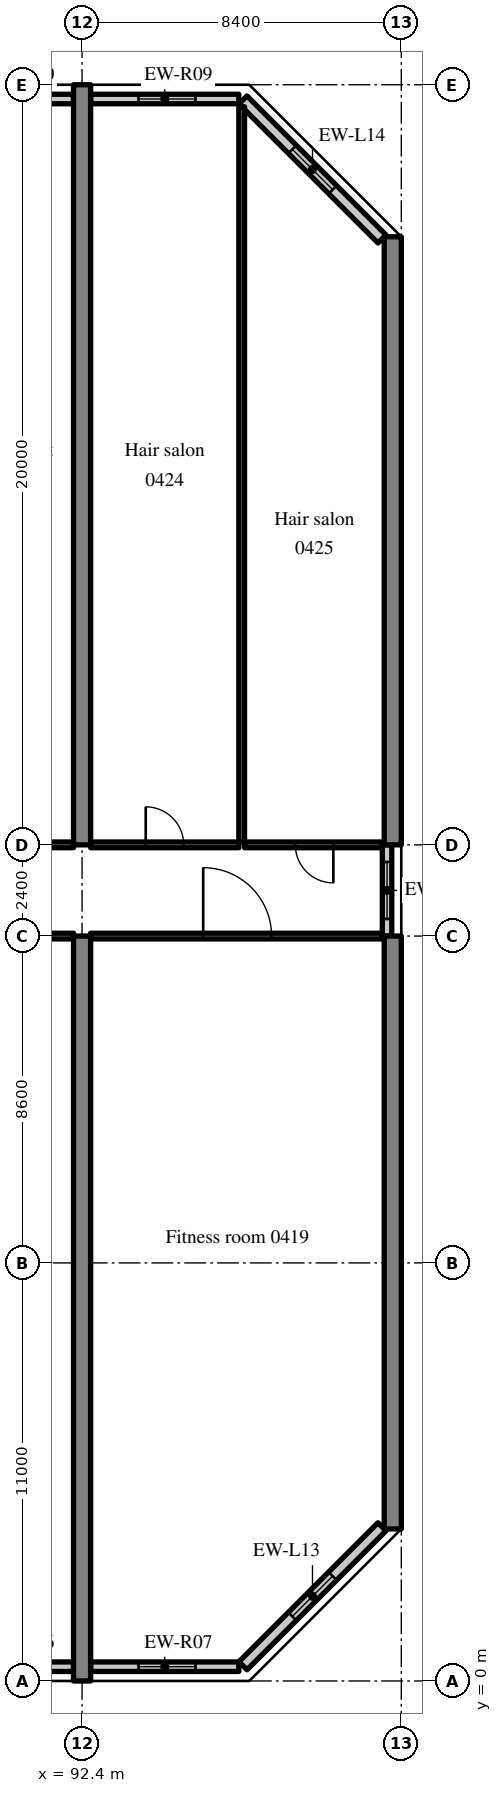
"""IFC4 building model, lengths in metres.
Left out: names, types, materials, properties, quantities, classifications, styles, units other than length and angle.
Written with IfcOpenShell. Run it as: python <this file> out.ifc"""

import sys

from ifc_helpers import new_model, si_unit, direction, frame, frame_2d, origin, place, context, subcontext, project, spatial, rectangle, extrude, source, transform, mapped, element, fill, save


model = new_model("IFC4")
c1 = context("Model", 3, precision=1e-05, world=origin(), true_north=direction((0.0, 1.0)))
c2 = subcontext(c1, "Body", "Model", "MODEL_VIEW")
j1 = project(units=[si_unit("LENGTHUNIT", "METRE"), si_unit("PLANEANGLEUNIT", "RADIAN")], contexts=[c1])
p1 = place(None, origin())
s1 = spatial("IfcSite", under=j1, at=p1, CompositionType="ELEMENT")
p2 = place(p1, origin())
s2 = spatial("IfcBuilding", under=s1, at=p2, CompositionType="ELEMENT")
p3 = place(p2, frame((0.0, 0.0, 23.0)))
s3 = spatial("IfcBuildingStorey", under=s2, at=p3, CompositionType="ELEMENT", Elevation=23.0)
m1 = source(origin(), c2, "Body", "SweptSolid", [
    extrude(rectangle(XDim=19.6, YDim=0.45, at=frame_2d((9.8, 0.0))), origin(), (0.0, 0.0, 1.0), 4.52),
])
p4 = place(p3, frame((92.4, 0.0, 0.0), z_axis=(0.0, 0.0, 1.0), x_axis=(0.0, 1.0, 0.0)))
e1 = element("IfcWall", 1, at=p4, inside=s3, PredefinedType="SHEAR", context=c2, shape_type="MappedRepresentation", body=[
    mapped(m1, transform((0.0, 0.0, 0.0), scale=1.0)),
])
m2 = source(origin(), c2, "Body", "SweptSolid", [
    extrude(rectangle(XDim=20.0, YDim=0.45, at=frame_2d((10.0, 0.0))), origin(), (0.0, 0.0, 1.0), 4.52),
])
p5 = place(p3, frame((92.4, 22.0, 0.0), z_axis=(0.0, 0.0, 1.0), x_axis=(0.0, 1.0, 0.0)))
e2 = element("IfcWall", 2, at=p5, inside=s3, PredefinedType="SHEAR", context=c2, shape_type="MappedRepresentation", body=[
    mapped(m2, transform((0.0, 0.0, 0.0), scale=1.0)),
])
m3 = source(origin(), c2, "Body", "SweptSolid", [
    extrude(rectangle(XDim=15.6, YDim=0.45, at=frame_2d((7.8, 0.0))), origin(), (0.0, 0.0, 1.0), 4.52),
])
p6 = place(p3, frame((100.575, 4.0, 0.0), z_axis=(0.0, 0.0, 1.0), x_axis=(0.0, 1.0, 0.0)))
e3 = element("IfcWall", 3, at=p6, inside=s3, PredefinedType="SHEAR", context=c2, shape_type="MappedRepresentation", body=[
    mapped(m3, transform((0.0, 0.0, 0.0), scale=1.0)),
])
m4 = source(origin(), c2, "Body", "SweptSolid", [
    extrude(rectangle(XDim=16.0, YDim=0.45, at=frame_2d((8.0, 0.0))), origin(), (0.0, 0.0, 1.0), 4.52),
])
p7 = place(p3, frame((100.575, 22.0, 0.0), z_axis=(0.0, 0.0, 1.0), x_axis=(0.0, 1.0, 0.0)))
e4 = element("IfcWall", 4, at=p7, inside=s3, PredefinedType="SHEAR", context=c2, shape_type="MappedRepresentation", body=[
    mapped(m4, transform((0.0, 0.0, 0.0), scale=1.0)),
])
m5 = source(origin(), c2, "Body", "SweptSolid", [
    extrude(rectangle(XDim=3.525, YDim=0.25, at=frame_2d((1.763, 0.0))), origin(), (0.0, 0.0, 1.0), 3.77),
])
p8 = place(p3, frame((88.65, 0.375, 0.0), z_axis=(0.0, 0.0, 1.0), x_axis=(1.0, 0.0, 0.0)))
e5 = element("IfcWall", 5, at=p8, inside=s3, PredefinedType="SOLIDWALL", context=c2, shape_type="MappedRepresentation", body=[
    mapped(m5, transform((0.0, 0.0, 0.0), scale=1.0)),
])
m6 = source(origin(), c2, "Body", "SweptSolid", [
    extrude(rectangle(XDim=1.5, YDim=1.5, at=frame_2d((0.75, 0.75))), frame((0.0, 0.135, 0.0), z_axis=(0.0, -1.0, 0.0), x_axis=(1.0, 0.0, 0.0)), (0.0, 0.0, 1.0), 0.27),
])
p9 = place(p8, frame((1.012, 0.0, 0.9)))
e6 = element("IfcOpeningElement", 6, at=p9, cuts=e5, PredefinedType="OPENING", context=c2, shape_type="MappedRepresentation", body=[
    mapped(m6, transform((0.0, 0.0, 0.0), scale=1.0)),
])
m7 = source(origin(), c2, "Body", "SweptSolid", [
    extrude(rectangle(XDim=3.9, YDim=0.25, at=frame_2d((1.95, 0.0))), origin(), (0.0, 0.0, 1.0), 3.77),
])
p10 = place(p3, frame((92.625, 0.375, 0.0), z_axis=(0.0, 0.0, 1.0), x_axis=(1.0, 0.0, 0.0)))
e7 = element("IfcWall", 7, at=p10, inside=s3, PredefinedType="SOLIDWALL", context=c2, shape_type="MappedRepresentation", body=[
    mapped(m7, transform((0.0, 0.0, 0.0), scale=1.0)),
])
p11 = place(p10, frame((1.26, 0.0, 0.9)))
e8 = element("IfcOpeningElement", 8, at=p11, cuts=e7, PredefinedType="OPENING", context=c2, shape_type="MappedRepresentation", body=[
    mapped(m6, transform((0.0, 0.0, 0.0), scale=1.0)),
])
m8 = source(origin(), c2, "Body", "SweptSolid", [
    extrude(rectangle(XDim=5.173, YDim=0.3, at=frame_2d((2.586, 0.0))), origin(), (0.0, 0.0, 1.0), 3.77),
])
p12 = place(p3, frame((96.634, 0.4, 0.0), z_axis=(0.0, 0.0, 1.0), x_axis=(0.707106781187, 0.707106781187, 0.0)))
e9 = element("IfcWall", 9, at=p12, inside=s3, PredefinedType="SOLIDWALL", context=c2, shape_type="MappedRepresentation", body=[
    mapped(m8, transform((0.0, 0.0, 0.0), scale=1.0)),
])
m9 = source(origin(), c2, "Body", "SweptSolid", [
    extrude(rectangle(XDim=1.5, YDim=1.5, at=frame_2d((0.75, 0.75))), frame((0.0, 0.16, 0.0), z_axis=(0.0, -1.0, 0.0), x_axis=(1.0, 0.0, 0.0)), (0.0, 0.0, 1.0), 0.32),
])
p13 = place(p12, frame((1.836, 0.0, 0.9)))
e10 = element("IfcOpeningElement", 10, at=p13, cuts=e9, PredefinedType="OPENING", context=c2, shape_type="MappedRepresentation", body=[
    mapped(m9, transform((0.0, 0.0, 0.0), scale=1.0)),
])
m10 = source(origin(), c2, "Body", "SweptSolid", [
    extrude(rectangle(XDim=2.4, YDim=0.25, at=frame_2d((1.2, 0.0))), origin(), (0.0, 0.0, 1.0), 3.62),
])
p14 = place(p3, frame((100.425, 19.6, 0.0), z_axis=(0.0, 0.0, 1.0), x_axis=(0.0, 1.0, 0.0)))
e11 = element("IfcWall", 11, at=p14, inside=s3, PredefinedType="SOLIDWALL", context=c2, shape_type="MappedRepresentation", body=[
    mapped(m10, transform((0.0, 0.0, 0.0), scale=1.0)),
])
p15 = place(p14, frame((0.45, 0.0, 0.9)))
e12 = element("IfcOpeningElement", 12, at=p15, cuts=e11, PredefinedType="OPENING", context=c2, shape_type="MappedRepresentation", body=[
    mapped(m6, transform((0.0, 0.0, 0.0), scale=1.0)),
])
p16 = place(p3, frame((100.292, 37.942, 0.0), z_axis=(0.0, 0.0, 1.0), x_axis=(-0.707106781187, 0.707106781187, 0.0)))
e13 = element("IfcWall", 13, at=p16, inside=s3, PredefinedType="SOLIDWALL", context=c2, shape_type="MappedRepresentation", body=[
    mapped(m8, transform((0.0, 0.0, 0.0), scale=1.0)),
])
p17 = place(p16, frame((1.836, 0.0, 0.9)))
e14 = element("IfcOpeningElement", 14, at=p17, cuts=e13, PredefinedType="OPENING", context=c2, shape_type="MappedRepresentation", body=[
    mapped(m9, transform((0.0, 0.0, 0.0), scale=1.0)),
])
p18 = place(p3, frame((96.525, 41.625, 0.0), z_axis=(0.0, 0.0, 1.0), x_axis=(-1.0, 0.0, 0.0)))
e15 = element("IfcWall", 15, at=p18, inside=s3, PredefinedType="SOLIDWALL", context=c2, shape_type="MappedRepresentation", body=[
    mapped(m7, transform((0.0, 0.0, 0.0), scale=1.0)),
])
p19 = place(p18, frame((1.14, 0.0, 0.9)))
e16 = element("IfcOpeningElement", 16, at=p19, cuts=e15, PredefinedType="OPENING", context=c2, shape_type="MappedRepresentation", body=[
    mapped(m6, transform((0.0, 0.0, 0.0), scale=1.0)),
])
p20 = place(p3, frame((92.175, 41.625, 0.0), z_axis=(0.0, 0.0, 1.0), x_axis=(-1.0, 0.0, 0.0)))
e17 = element("IfcWall", 17, at=p20, inside=s3, PredefinedType="SOLIDWALL", context=c2, shape_type="MappedRepresentation", body=[
    mapped(m5, transform((0.0, 0.0, 0.0), scale=1.0)),
])
p21 = place(p20, frame((1.012, 0.0, 0.9)))
e18 = element("IfcOpeningElement", 18, at=p21, cuts=e17, PredefinedType="OPENING", context=c2, shape_type="MappedRepresentation", body=[
    mapped(m6, transform((0.0, 0.0, 0.0), scale=1.0)),
])
m11 = source(origin(), c2, "Body", "SweptSolid", [
    extrude(rectangle(XDim=7.95, YDim=0.15, at=frame_2d((3.975, 0.0))), origin(), (0.0, 0.0, 1.0), 3.82),
])
p22 = place(p3, frame((84.225, 19.6, 0.0), z_axis=(0.0, 0.0, 1.0), x_axis=(1.0, 0.0, 0.0)))
e19 = element("IfcWall", 19, at=p22, inside=s3, PredefinedType="PARTITIONING", context=c2, shape_type="MappedRepresentation", body=[
    mapped(m11, transform((0.0, 0.0, 0.0), scale=1.0)),
])
m12 = source(origin(), c2, "Body", "SweptSolid", [
    extrude(rectangle(XDim=1.8, YDim=2.1, at=frame_2d((0.9, 1.05))), frame((0.0, 0.085, 0.0), z_axis=(0.0, -1.0, 0.0), x_axis=(1.0, 0.0, 0.0)), (0.0, 0.0, 1.0), 0.17),
])
p23 = place(p22, frame((3.075, 0.0, 0.0)))
e20 = element("IfcOpeningElement", 20, at=p23, cuts=e19, PredefinedType="OPENING", context=c2, shape_type="MappedRepresentation", body=[
    mapped(m12, transform((0.0, 0.0, 0.0), scale=1.0)),
])
m13 = source(origin(), c2, "Body", "SweptSolid", [
    extrude(rectangle(XDim=7.675, YDim=0.15, at=frame_2d((3.837, 0.0))), origin(), (0.0, 0.0, 1.0), 3.82),
])
p24 = place(p3, frame((92.625, 19.6, 0.0), z_axis=(0.0, 0.0, 1.0), x_axis=(1.0, 0.0, 0.0)))
e21 = element("IfcWall", 21, at=p24, inside=s3, PredefinedType="PARTITIONING", context=c2, shape_type="MappedRepresentation", body=[
    mapped(m13, transform((0.0, 0.0, 0.0), scale=1.0)),
])
p25 = place(p24, frame((2.962, 0.0, 0.0)))
e22 = element("IfcOpeningElement", 22, at=p25, cuts=e21, PredefinedType="OPENING", context=c2, shape_type="MappedRepresentation", body=[
    mapped(m12, transform((0.0, 0.0, 0.0), scale=1.0)),
])
m14 = source(origin(), c2, "Body", "SweptSolid", [
    extrude(rectangle(XDim=3.9, YDim=0.15, at=frame_2d((1.95, 0.0))), origin(), (0.0, 0.0, 1.0), 3.82),
])
p26 = place(p3, frame((88.275, 22.0, 0.0), z_axis=(0.0, 0.0, 1.0), x_axis=(1.0, 0.0, 0.0)))
e23 = element("IfcWall", 23, at=p26, inside=s3, PredefinedType="PARTITIONING", context=c2, shape_type="MappedRepresentation", body=[
    mapped(m14, transform((0.0, 0.0, 0.0), scale=1.0)),
])
m15 = source(origin(), c2, "Body", "SweptSolid", [
    extrude(rectangle(XDim=1.0, YDim=2.1, at=frame_2d((0.5, 1.05))), frame((0.0, 0.085, 0.0), z_axis=(0.0, -1.0, 0.0), x_axis=(1.0, 0.0, 0.0)), (0.0, 0.0, 1.0), 0.17),
])
p27 = place(p26, frame((1.45, 0.0, 0.0)))
e24 = element("IfcOpeningElement", 24, at=p27, cuts=e23, PredefinedType="OPENING", context=c2, shape_type="MappedRepresentation", body=[
    mapped(m15, transform((0.0, 0.0, 0.0), scale=1.0)),
])
m16 = source(origin(), c2, "Body", "SweptSolid", [
    extrude(rectangle(XDim=3.9, YDim=0.15, at=frame_2d((1.95, 0.0))), origin(), (0.0, 0.0, 1.0), 3.82),
])
p28 = place(p3, frame((92.625, 22.0, 0.0), z_axis=(0.0, 0.0, 1.0), x_axis=(1.0, 0.0, 0.0)))
e25 = element("IfcWall", 25, at=p28, inside=s3, PredefinedType="PARTITIONING", context=c2, shape_type="MappedRepresentation", body=[
    mapped(m16, transform((0.0, 0.0, 0.0), scale=1.0)),
])
p29 = place(p28, frame((1.45, 0.0, 0.0)))
e26 = element("IfcOpeningElement", 26, at=p29, cuts=e25, PredefinedType="OPENING", context=c2, shape_type="MappedRepresentation", body=[
    mapped(m15, transform((0.0, 0.0, 0.0), scale=1.0)),
])
m17 = source(origin(), c2, "Body", "SweptSolid", [
    extrude(rectangle(XDim=3.625, YDim=0.15, at=frame_2d((1.812, 0.0))), origin(), (0.0, 0.0, 1.0), 3.82),
])
p30 = place(p3, frame((96.675, 22.0, 0.0), z_axis=(0.0, 0.0, 1.0), x_axis=(1.0, 0.0, 0.0)))
e27 = element("IfcWall", 27, at=p30, inside=s3, PredefinedType="PARTITIONING", context=c2, shape_type="MappedRepresentation", body=[
    mapped(m17, transform((0.0, 0.0, 0.0), scale=1.0)),
])
p31 = place(p30, frame((1.337, 0.0, 0.0)))
e28 = element("IfcOpeningElement", 28, at=p31, cuts=e27, PredefinedType="OPENING", context=c2, shape_type="MappedRepresentation", body=[
    mapped(m15, transform((0.0, 0.0, 0.0), scale=1.0)),
])
m18 = source(origin(), c2, "Body", "SweptSolid", [
    extrude(rectangle(XDim=19.347, YDim=0.15, at=frame_2d((9.674, 0.0))), origin(), (0.0, 0.0, 1.0), 4.52),
])
p32 = place(p3, frame((96.6, 22.075, 0.0), z_axis=(0.0, 0.0, 1.0), x_axis=(0.0, 1.0, 0.0)))
e29 = element("IfcWall", 29, at=p32, inside=s3, PredefinedType="PARTITIONING", context=c2, shape_type="MappedRepresentation", body=[
    mapped(m18, transform((0.0, 0.0, 0.0), scale=1.0)),
])
m19 = source(origin(), c2, "Body", "SweptSolid", [
    extrude(rectangle(XDim=1.5, YDim=1.5, at=frame_2d((0.75, 0.75))), frame((0.0, 0.03, 0.0), z_axis=(0.0, -1.0, 0.0), x_axis=(1.0, 0.0, 0.0)), (0.0, 0.0, 1.0), 0.06),
])
p33 = place(p11, origin())
e30 = element("IfcWindow", 30, at=p33, inside=s3, PartitioningType="SINGLE_PANEL", PredefinedType="WINDOW", context=c2, shape_type="MappedRepresentation", body=[
    mapped(m19, transform((0.0, 0.0, 0.0), scale=1.0)),
])
fill(e8, e30)
p34 = place(p13, origin())
e31 = element("IfcWindow", 31, at=p34, inside=s3, PartitioningType="SINGLE_PANEL", PredefinedType="WINDOW", context=c2, shape_type="MappedRepresentation", body=[
    mapped(m19, transform((0.0, 0.0, 0.0), scale=1.0)),
])
fill(e10, e31)
p35 = place(p15, origin())
e32 = element("IfcWindow", 32, at=p35, inside=s3, PartitioningType="SINGLE_PANEL", PredefinedType="WINDOW", context=c2, shape_type="MappedRepresentation", body=[
    mapped(m19, transform((0.0, 0.0, 0.0), scale=1.0)),
])
fill(e12, e32)
p36 = place(p17, origin())
e33 = element("IfcWindow", 33, at=p36, inside=s3, PartitioningType="SINGLE_PANEL", PredefinedType="WINDOW", context=c2, shape_type="MappedRepresentation", body=[
    mapped(m19, transform((0.0, 0.0, 0.0), scale=1.0)),
])
fill(e14, e33)
p37 = place(p19, origin())
e34 = element("IfcWindow", 34, at=p37, inside=s3, PartitioningType="SINGLE_PANEL", PredefinedType="WINDOW", context=c2, shape_type="MappedRepresentation", body=[
    mapped(m19, transform((0.0, 0.0, 0.0), scale=1.0)),
])
fill(e16, e34)
m20 = source(origin(), c2, "Body", "SweptSolid", [
    extrude(rectangle(XDim=1.8, YDim=2.1, at=frame_2d((0.9, 1.05))), frame((0.0, 0.025, 0.0), z_axis=(0.0, -1.0, 0.0), x_axis=(1.0, 0.0, 0.0)), (0.0, 0.0, 1.0), 0.05),
])
p38 = place(p25, origin())
e35 = element("IfcDoor", 35, at=p38, inside=s3, OperationType="DOUBLE_DOOR_SINGLE_SWING", PredefinedType="DOOR", context=c2, shape_type="MappedRepresentation", body=[
    mapped(m20, transform((0.0, 0.0, 0.0), scale=1.0)),
])
fill(e22, e35)
m21 = source(origin(), c2, "Body", "SweptSolid", [
    extrude(rectangle(XDim=1.0, YDim=2.1, at=frame_2d((0.5, 1.05))), frame((0.0, 0.025, 0.0), z_axis=(0.0, -1.0, 0.0), x_axis=(1.0, 0.0, 0.0)), (0.0, 0.0, 1.0), 0.05),
])
p39 = place(p29, origin())
e36 = element("IfcDoor", 36, at=p39, inside=s3, OperationType="SINGLE_SWING_LEFT", PredefinedType="DOOR", context=c2, shape_type="MappedRepresentation", body=[
    mapped(m21, transform((0.0, 0.0, 0.0), scale=1.0)),
])
fill(e26, e36)
p40 = place(p31, origin())
e37 = element("IfcDoor", 37, at=p40, inside=s3, OperationType="SINGLE_SWING_RIGHT", PredefinedType="DOOR", context=c2, shape_type="MappedRepresentation", body=[
    mapped(m21, transform((0.0, 0.0, 0.0), scale=1.0)),
])
fill(e28, e37)
save(model, sys.argv[1])
